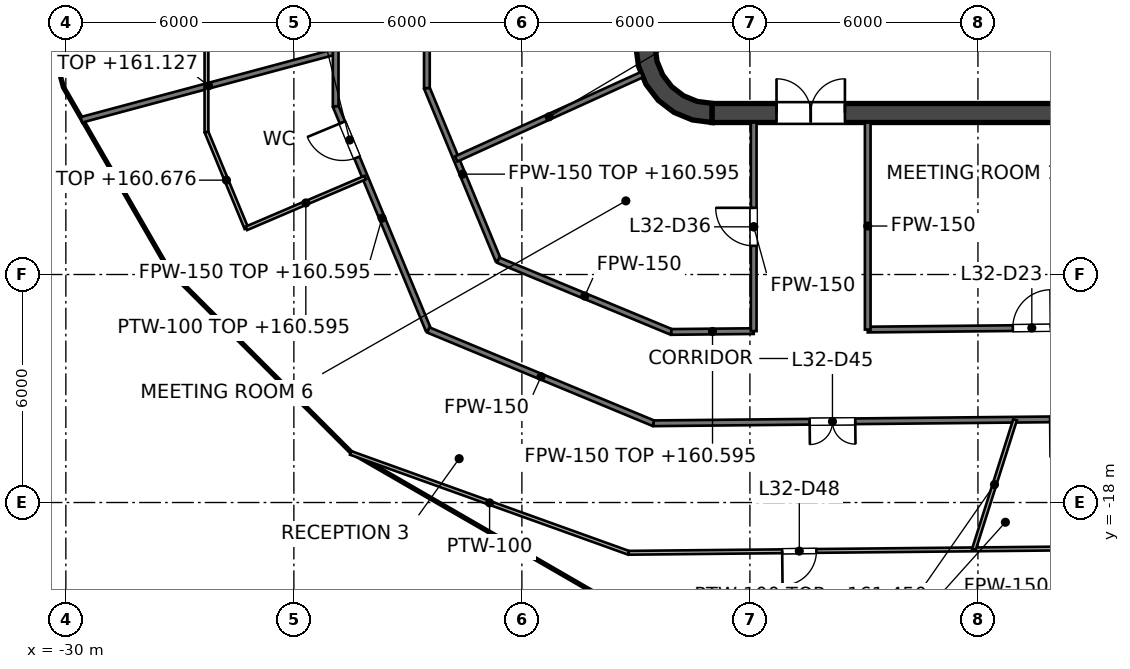
"""IFC4 building model, lengths in metres.
Left out: names, types, materials, properties, quantities, classifications, styles, units other than length and angle.
Written with IfcOpenShell. Run it as: python <this file> out.ifc"""

import sys

from ifc_helpers import new_model, si_unit, direction, frame, frame_2d, origin, place, context, subcontext, project, spatial, polyline, rectangle, outline, extrude, element, fill, save


model = new_model("IFC4")
c1 = context("Model", 3, precision=1e-05, world=origin(), true_north=direction((0.0, 1.0)))
c2 = subcontext(c1, "Body", "Model", "MODEL_VIEW")
j1 = project(units=[si_unit("LENGTHUNIT", "METRE"), si_unit("PLANEANGLEUNIT", "RADIAN")], contexts=[c1])
p1 = place(None, origin())
s1 = spatial("IfcSite", under=j1, at=p1, CompositionType="ELEMENT")
p2 = place(p1, origin())
s2 = spatial("IfcBuilding", under=s1, at=p2, CompositionType="ELEMENT")
p3 = place(p2, frame((0.0, 0.0, 157.6)))
s3 = spatial("IfcBuildingStorey", under=s2, at=p3, CompositionType="ELEMENT", Elevation=157.6)
p4 = place(p3, frame((-13.0, -7.75, 0.0), z_axis=(0.0, 0.0, 1.0), x_axis=(1.0, 0.0, 0.0)))
e1 = element("IfcWall", 1, at=p4, inside=s3, PredefinedType="SHEAR", context=c2, shape_type="SweptSolid", body=[
    extrude(rectangle(XDim=26.0, YDim=0.5, at=frame_2d((13.0, 0.0))), origin(), (0.0, 0.0, 1.0), 4.0),
])
p5 = place(p4, frame((1.7, 0.0, 0.0)))
e2 = element("IfcOpeningElement", 2, at=p5, cuts=e1, PredefinedType="OPENING", context=c2, shape_type="SweptSolid", body=[
    extrude(rectangle(XDim=1.8, YDim=2.1, at=frame_2d((0.9, 1.05))), frame((0.0, 0.25, 0.0), z_axis=(0.0, -1.0, 0.0), x_axis=(1.0, 0.0, 0.0)), (0.0, 0.0, 1.0), 0.5),
])
p6 = place(p4, frame((22.5, 0.0, 0.0)))
e3 = element("IfcOpeningElement", 3, at=p6, cuts=e1, PredefinedType="OPENING", context=c2, shape_type="SweptSolid", body=[
    extrude(rectangle(XDim=1.8, YDim=2.1, at=frame_2d((0.9, 1.05))), frame((0.0, 0.25, 0.0), z_axis=(0.0, -1.0, 0.0), x_axis=(1.0, 0.0, 0.0)), (0.0, 0.0, 1.0), 0.5),
])
p7 = place(p3, origin())
e4 = element("IfcWall", 4, at=p7, inside=s3, PredefinedType="SHEAR", context=c2, shape_type="SweptSolid", body=[
    extrude(outline(polyline([(-13.0, -8.0), (-13.0, -7.496), (-13.387, -7.445), (-13.748, -7.295), (-14.058, -7.058), (-14.295, -6.748), (-14.445, -6.387), (-14.496, -6.0), (-15.0, -6.0), (-14.932, -6.518), (-14.732, -7.0), (-14.414, -7.414), (-14.0, -7.732), (-13.518, -7.932), (-13.0, -8.0)])), origin(), (0.0, 0.0, 1.0), 4.0),
])
p8 = place(p3, frame((-9.0, -6.6, 0.0), z_axis=(0.0, 0.0, 1.0), x_axis=(0.0, 1.0, 0.0)))
e5 = element("IfcWall", 5, at=p8, inside=s3, PredefinedType="PARTITIONING", context=c2, shape_type="SweptSolid", body=[
    extrude(rectangle(XDim=2.5, YDim=0.25, at=frame_2d((1.25, 0.0))), origin(), (0.0, 0.0, 1.0), 3.85),
])
p9 = place(p8, frame((0.75, 0.0, 0.0)))
e6 = element("IfcOpeningElement", 6, at=p9, cuts=e5, PredefinedType="OPENING", context=c2, shape_type="SweptSolid", body=[
    extrude(rectangle(XDim=1.0, YDim=2.1, at=frame_2d((0.5, 1.05))), frame((0.0, 0.125, 0.0), z_axis=(0.0, -1.0, 0.0), x_axis=(1.0, 0.0, 0.0)), (0.0, 0.0, 1.0), 0.25),
])
p10 = place(p3, frame((-9.125, -7.05, 0.0), z_axis=(0.0, 0.0, 1.0), x_axis=(1.0, 0.0, 0.0)))
e7 = element("IfcWall", 7, at=p10, inside=s3, PredefinedType="SOLIDWALL", context=c2, shape_type="SweptSolid", body=[
    extrude(rectangle(XDim=18.25, YDim=0.9, at=frame_2d((9.125, 0.0))), origin(), (0.0, 0.0, 1.0), 3.85),
])
p11 = place(p3, frame((-11.8, -7.5, 0.0), z_axis=(0.0, 0.0, 1.0), x_axis=(0.0, 1.0, 0.0)))
e8 = element("IfcWall", 8, at=p11, inside=s3, PredefinedType="SOLIDWALL", context=c2, shape_type="SweptSolid", body=[
    extrude(rectangle(XDim=15.0, YDim=0.4, at=frame_2d((7.5, 0.0))), origin(), (0.0, 0.0, 1.0), 3.85),
])
p12 = place(p11, frame((11.3, 0.0, 0.0)))
e9 = element("IfcOpeningElement", 9, at=p12, cuts=e8, PredefinedType="OPENING", context=c2, shape_type="SweptSolid", body=[
    extrude(rectangle(XDim=1.1, YDim=2.1, at=frame_2d((0.55, 1.05))), frame((0.0, 0.2, 0.0), z_axis=(0.0, -1.0, 0.0), x_axis=(1.0, 0.0, 0.0)), (0.0, 0.0, 1.0), 0.4),
])
p13 = place(p11, frame((8.4, 0.0, 0.0)))
e10 = element("IfcOpeningElement", 10, at=p13, cuts=e8, PredefinedType="OPENING", context=c2, shape_type="SweptSolid", body=[
    extrude(rectangle(XDim=1.1, YDim=2.1, at=frame_2d((0.55, 1.05))), frame((0.0, 0.2, 0.0), z_axis=(0.0, -1.0, 0.0), x_axis=(1.0, 0.0, 0.0)), (0.0, 0.0, 1.0), 0.4),
])
p14 = place(p11, frame((5.5, 0.0, 0.0)))
e11 = element("IfcOpeningElement", 11, at=p14, cuts=e8, PredefinedType="OPENING", context=c2, shape_type="SweptSolid", body=[
    extrude(rectangle(XDim=1.1, YDim=2.1, at=frame_2d((0.55, 1.05))), frame((0.0, 0.2, 0.0), z_axis=(0.0, -1.0, 0.0), x_axis=(1.0, 0.0, 0.0)), (0.0, 0.0, 1.0), 0.4),
])
p15 = place(p11, frame((13.697, 0.0, 0.0)))
e12 = element("IfcOpeningElement", 12, at=p15, cuts=e8, PredefinedType="OPENING", context=c2, shape_type="SweptSolid", body=[
    extrude(rectangle(XDim=0.9, YDim=2.1, at=frame_2d((0.45, 1.05))), frame((0.0, 0.2, 0.0), z_axis=(0.0, -1.0, 0.0), x_axis=(1.0, 0.0, 0.0)), (0.0, 0.0, 1.0), 0.4),
])
p16 = place(p11, frame((0.403, 0.0, 0.0)))
e13 = element("IfcOpeningElement", 13, at=p16, cuts=e8, PredefinedType="OPENING", context=c2, shape_type="SweptSolid", body=[
    extrude(rectangle(XDim=0.9, YDim=2.1, at=frame_2d((0.45, 1.05))), frame((0.0, 0.2, 0.0), z_axis=(0.0, -1.0, 0.0), x_axis=(1.0, 0.0, 0.0)), (0.0, 0.0, 1.0), 0.4),
])
p17 = place(p3, frame((-22.9, -7.572, 0.0), z_axis=(0.0, 0.0, 1.0), x_axis=(0.382860357704, -0.923806227788, 0.0)))
e14 = element("IfcWall", 14, at=p17, inside=s3, PredefinedType="PARTITIONING", context=c2, shape_type="SweptSolid", body=[
    extrude(rectangle(XDim=6.374, YDim=0.15, at=frame_2d((3.187, 0.0))), origin(), (0.0, 0.0, 1.0), 2.995),
])
p18 = place(p17, frame((0.462, 0.0, 0.0)))
e15 = element("IfcOpeningElement", 15, at=p18, cuts=e14, PredefinedType="OPENING", context=c2, shape_type="SweptSolid", body=[
    extrude(rectangle(XDim=1.0, YDim=2.1, at=frame_2d((0.5, 1.05))), frame((0.0, 0.075, 0.0), z_axis=(0.0, -1.0, 0.0), x_axis=(1.0, 0.0, 0.0)), (0.0, 0.0, 1.0), 0.15),
])
p19 = place(p3, frame((-20.5, -7.095, 0.0), z_axis=(0.0, 0.0, 1.0), x_axis=(0.382878184095, -0.923798839653, 0.0)))
e16 = element("IfcWall", 16, at=p19, inside=s3, PredefinedType="PARTITIONING", context=c2, shape_type="SweptSolid", body=[
    extrude(rectangle(XDim=4.902, YDim=0.15, at=frame_2d((2.451, 0.0))), origin(), (0.0, 0.0, 1.0), 2.995),
])
p20 = place(p3, frame((-20.46, -13.46, 0.0), z_axis=(0.0, 0.0, 1.0), x_axis=(0.923801547606, -0.382871650349, 0.0)))
e17 = element("IfcWall", 17, at=p20, inside=s3, PredefinedType="PARTITIONING", context=c2, shape_type="SweptSolid", body=[
    extrude(rectangle(XDim=6.415, YDim=0.15, at=frame_2d((3.208, 0.0))), origin(), (0.0, 0.0, 1.0), 2.927),
])
p21 = place(p3, frame((-18.623, -11.623, 0.0), z_axis=(0.0, 0.0, 1.0), x_axis=(0.923791670587, -0.38289548098, 0.0)))
e18 = element("IfcWall", 18, at=p21, inside=s3, PredefinedType="PARTITIONING", context=c2, shape_type="SweptSolid", body=[
    extrude(rectangle(XDim=4.931, YDim=0.15, at=frame_2d((2.465, 0.0))), origin(), (0.0, 0.0, 1.0), 2.927),
])
p22 = place(p3, frame((-14.534, -15.915, 0.0), z_axis=(0.0, 0.0, 1.0), x_axis=(0.999950930262, 0.009906415532, 0.0)))
e19 = element("IfcWall", 19, at=p22, inside=s3, PredefinedType="PARTITIONING", context=c2, shape_type="SweptSolid", body=[
    extrude(rectangle(XDim=33.123, YDim=0.15, at=frame_2d((16.561, 0.0))), origin(), (0.0, 0.0, 1.0), 2.927),
])
p23 = place(p22, frame((4.106, 0.0, 0.0)))
e20 = element("IfcOpeningElement", 20, at=p23, cuts=e19, PredefinedType="OPENING", context=c2, shape_type="SweptSolid", body=[
    extrude(rectangle(XDim=1.2, YDim=2.1, at=frame_2d((0.6, 1.05))), frame((0.0, 0.075, 0.0), z_axis=(0.0, -1.0, 0.0), x_axis=(1.0, 0.0, 0.0)), (0.0, 0.0, 1.0), 0.15),
])
p24 = place(p22, frame((10.434, 0.0, 0.0)))
e21 = element("IfcOpeningElement", 21, at=p24, cuts=e19, PredefinedType="OPENING", context=c2, shape_type="SweptSolid", body=[
    extrude(rectangle(XDim=1.0, YDim=2.1, at=frame_2d((0.5, 1.05))), frame((0.0, 0.075, 0.0), z_axis=(0.0, -1.0, 0.0), x_axis=(1.0, 0.0, 0.0)), (0.0, 0.0, 1.0), 0.15),
])
p25 = place(p22, frame((12.942, 0.0, 0.0)))
e22 = element("IfcOpeningElement", 22, at=p25, cuts=e19, PredefinedType="OPENING", context=c2, shape_type="SweptSolid", body=[
    extrude(rectangle(XDim=1.0, YDim=2.1, at=frame_2d((0.5, 1.05))), frame((0.0, 0.075, 0.0), z_axis=(0.0, -1.0, 0.0), x_axis=(1.0, 0.0, 0.0)), (0.0, 0.0, 1.0), 0.15),
])
p26 = place(p22, frame((16.111, 0.0, 0.0)))
e23 = element("IfcOpeningElement", 23, at=p26, cuts=e19, PredefinedType="OPENING", context=c2, shape_type="SweptSolid", body=[
    extrude(rectangle(XDim=1.0, YDim=2.1, at=frame_2d((0.5, 1.05))), frame((0.0, 0.075, 0.0), z_axis=(0.0, -1.0, 0.0), x_axis=(1.0, 0.0, 0.0)), (0.0, 0.0, 1.0), 0.15),
])
p27 = place(p22, frame((24.318, 0.0, 0.0)))
e24 = element("IfcOpeningElement", 24, at=p27, cuts=e19, PredefinedType="OPENING", context=c2, shape_type="SweptSolid", body=[
    extrude(rectangle(XDim=1.0, YDim=2.1, at=frame_2d((0.5, 1.05))), frame((0.0, 0.075, 0.0), z_axis=(0.0, -1.0, 0.0), x_axis=(1.0, 0.0, 0.0)), (0.0, 0.0, 1.0), 0.15),
])
p28 = place(p3, frame((-14.068, -13.511, 0.0), z_axis=(0.0, 0.0, 1.0), x_axis=(0.999950911515, 0.009908307647, 0.0)))
e25 = element("IfcWall", 25, at=p28, inside=s3, PredefinedType="PARTITIONING", context=c2, shape_type="SweptSolid", body=[
    extrude(rectangle(XDim=2.168, YDim=0.15, at=frame_2d((1.084, 0.0))), origin(), (0.0, 0.0, 1.0), 2.995),
])
p29 = place(p3, frame((-8.9, -13.449, 0.0), z_axis=(0.0, 0.0, 1.0), x_axis=(0.999950834077, 0.009916119672, 0.0)))
e26 = element("IfcWall", 26, at=p29, inside=s3, PredefinedType="PARTITIONING", context=c2, shape_type="SweptSolid", body=[
    extrude(rectangle(XDim=17.801, YDim=0.15, at=frame_2d((8.9, 0.0))), origin(), (0.0, 0.0, 1.0), 2.927),
])
p30 = place(p29, frame((3.818, 0.0, 0.0)))
e27 = element("IfcOpeningElement", 27, at=p30, cuts=e26, PredefinedType="OPENING", context=c2, shape_type="SweptSolid", body=[
    extrude(rectangle(XDim=1.0, YDim=2.1, at=frame_2d((0.5, 1.05))), frame((0.0, 0.075, 0.0), z_axis=(0.0, -1.0, 0.0), x_axis=(1.0, 0.0, 0.0)), (0.0, 0.0, 1.0), 0.15),
])
p31 = place(p29, frame((8.391, 0.0, 0.0)))
e28 = element("IfcOpeningElement", 28, at=p31, cuts=e26, PredefinedType="OPENING", context=c2, shape_type="SweptSolid", body=[
    extrude(rectangle(XDim=1.0, YDim=2.1, at=frame_2d((0.5, 1.05))), frame((0.0, 0.075, 0.0), z_axis=(0.0, -1.0, 0.0), x_axis=(1.0, 0.0, 0.0)), (0.0, 0.0, 1.0), 0.15),
])
p32 = place(p29, frame((12.975, 0.0, 0.0)))
e29 = element("IfcOpeningElement", 29, at=p32, cuts=e26, PredefinedType="OPENING", context=c2, shape_type="SweptSolid", body=[
    extrude(rectangle(XDim=1.0, YDim=2.1, at=frame_2d((0.5, 1.05))), frame((0.0, 0.075, 0.0), z_axis=(0.0, -1.0, 0.0), x_axis=(1.0, 0.0, 0.0)), (0.0, 0.0, 1.0), 0.15),
])
p33 = place(p3, frame((-29.591, -7.929, 0.0), z_axis=(0.0, 0.0, 1.0), x_axis=(0.965923037728, 0.258829451931, 0.0)))
e30 = element("IfcWall", 30, at=p33, inside=s3, PredefinedType="PARTITIONING", context=c2, shape_type="SweptSolid", body=[
    extrude(rectangle(XDim=6.927, YDim=0.15, at=frame_2d((3.464, 0.0))), origin(), (0.0, 0.0, 1.0), 3.527),
])
p34 = place(p3, frame((-19.728, -8.958, 0.0), z_axis=(0.0, 0.0, 1.0), x_axis=(0.910629511797, 0.413223779863, 0.0)))
e31 = element("IfcWall", 31, at=p34, inside=s3, PredefinedType="PARTITIONING", context=c2, shape_type="SweptSolid", body=[
    extrude(rectangle(XDim=5.368, YDim=0.15, at=frame_2d((2.684, 0.0))), origin(), (0.0, 0.0, 1.0), 3.85),
])
p35 = place(p3, frame((-8.9, -13.449, 0.0), z_axis=(0.0, 0.0, 1.0), x_axis=(0.0, 1.0, 0.0)))
e32 = element("IfcWall", 32, at=p35, inside=s3, PredefinedType="PARTITIONING", context=c2, shape_type="SweptSolid", body=[
    extrude(rectangle(XDim=5.449, YDim=0.15, at=frame_2d((2.725, 0.0))), origin(), (0.0, 0.0, 1.0), 2.927),
])
p36 = place(p3, frame((-11.9, -13.49, 0.0), z_axis=(0.0, 0.0, 1.0), x_axis=(0.0, 1.0, 0.0)))
e33 = element("IfcWall", 33, at=p36, inside=s3, PredefinedType="PARTITIONING", context=c2, shape_type="SweptSolid", body=[
    extrude(rectangle(XDim=5.49, YDim=0.15, at=frame_2d((2.745, 0.0))), origin(), (0.0, 0.0, 1.0), 2.927),
])
p37 = place(p36, frame((2.245, 0.0, 0.0)))
e34 = element("IfcOpeningElement", 34, at=p37, cuts=e33, PredefinedType="OPENING", context=c2, shape_type="SweptSolid", body=[
    extrude(rectangle(XDim=1.0, YDim=2.1, at=frame_2d((0.5, 1.05))), frame((0.0, 0.075, 0.0), z_axis=(0.0, -1.0, 0.0), x_axis=(1.0, 0.0, 0.0)), (0.0, 0.0, 1.0), 0.15),
])
p38 = place(p3, frame((-20.5, -7.095, 0.0), z_axis=(0.0, 0.0, 1.0), x_axis=(0.0, 1.0, 0.0)))
e35 = element("IfcWall", 35, at=p38, inside=s3, PredefinedType="PARTITIONING", context=c2, shape_type="SweptSolid", body=[
    extrude(rectangle(XDim=14.569, YDim=0.15, at=frame_2d((7.285, 0.0))), origin(), (0.0, 0.0, 1.0), 2.927),
])
p39 = place(p38, frame((10.234, 0.0, 0.0)))
e36 = element("IfcOpeningElement", 36, at=p39, cuts=e35, PredefinedType="OPENING", context=c2, shape_type="SweptSolid", body=[
    extrude(rectangle(XDim=1.0, YDim=2.1, at=frame_2d((0.5, 1.05))), frame((0.0, 0.075, 0.0), z_axis=(0.0, -1.0, 0.0), x_axis=(1.0, 0.0, 0.0)), (0.0, 0.0, 1.0), 0.15),
])
p40 = place(p38, frame((3.0, 0.0, 0.0)))
e37 = element("IfcOpeningElement", 37, at=p40, cuts=e35, PredefinedType="OPENING", context=c2, shape_type="SweptSolid", body=[
    extrude(rectangle(XDim=1.0, YDim=2.1, at=frame_2d((0.5, 1.05))), frame((0.0, 0.075, 0.0), z_axis=(0.0, -1.0, 0.0), x_axis=(1.0, 0.0, 0.0)), (0.0, 0.0, 1.0), 0.15),
])
p41 = place(p3, frame((-22.9, -7.572, 0.0), z_axis=(0.0, 0.0, 1.0), x_axis=(0.0, 1.0, 0.0)))
e38 = element("IfcWall", 38, at=p41, inside=s3, PredefinedType="PARTITIONING", context=c2, shape_type="SweptSolid", body=[
    extrude(rectangle(XDim=15.689, YDim=0.15, at=frame_2d((7.844, 0.0))), origin(), (0.0, 0.0, 1.0), 2.927),
])
p42 = place(p41, frame((8.062, 0.0, 0.0)))
e39 = element("IfcOpeningElement", 39, at=p42, cuts=e38, PredefinedType="OPENING", context=c2, shape_type="SweptSolid", body=[
    extrude(rectangle(XDim=1.0, YDim=2.1, at=frame_2d((0.5, 1.05))), frame((0.0, 0.075, 0.0), z_axis=(0.0, -1.0, 0.0), x_axis=(1.0, 0.0, 0.0)), (0.0, 0.0, 1.0), 0.15),
])
p43 = place(p3, frame((-26.3, -8.249, 0.0), z_axis=(0.0, 0.0, 1.0), x_axis=(0.382878044957, -0.92379889732, 0.0)))
e40 = element("IfcWall", 40, at=p43, inside=s3, PredefinedType="PARTITIONING", context=c2, shape_type="SweptSolid", body=[
    extrude(rectangle(XDim=2.745, YDim=0.1, at=frame_2d((1.373, 0.0))), origin(), (0.0, 0.0, 1.0), 3.076),
])
p44 = place(p3, frame((-22.506, -16.695, 0.0), z_axis=(0.0, 0.0, 1.0), x_axis=(0.941067528236, -0.338218727009, 0.0)))
e41 = element("IfcWall", 41, at=p44, inside=s3, PredefinedType="PARTITIONING", context=c2, shape_type="SweptSolid", body=[
    extrude(rectangle(XDim=7.77, YDim=0.1, at=frame_2d((3.885, 0.0))), origin(), (0.0, 0.0, 1.0), 2.927),
])
p45 = place(p3, frame((-15.194, -19.323, 0.0), z_axis=(0.0, 0.0, 1.0), x_axis=(0.999950976029, 0.009901794681, 0.0)))
e42 = element("IfcWall", 42, at=p45, inside=s3, PredefinedType="PARTITIONING", context=c2, shape_type="SweptSolid", body=[
    extrude(rectangle(XDim=33.73, YDim=0.1, at=frame_2d((16.865, 0.0))), origin(), (0.0, 0.0, 1.0), 2.927),
])
p46 = place(p45, frame((4.043, 0.0, 0.0)))
e43 = element("IfcOpeningElement", 43, at=p46, cuts=e42, PredefinedType="OPENING", context=c2, shape_type="SweptSolid", body=[
    extrude(rectangle(XDim=0.9, YDim=2.1, at=frame_2d((0.45, 1.05))), frame((0.0, 0.05, 0.0), z_axis=(0.0, -1.0, 0.0), x_axis=(1.0, 0.0, 0.0)), (0.0, 0.0, 1.0), 0.1),
])
p47 = place(p45, frame((26.398, 0.0, 0.0)))
e44 = element("IfcOpeningElement", 44, at=p47, cuts=e42, PredefinedType="OPENING", context=c2, shape_type="SweptSolid", body=[
    extrude(rectangle(XDim=0.9, YDim=2.1, at=frame_2d((0.45, 1.05))), frame((0.0, 0.05, 0.0), z_axis=(0.0, -1.0, 0.0), x_axis=(1.0, 0.0, 0.0)), (0.0, 0.0, 1.0), 0.1),
])
p48 = place(p3, frame((-25.249, -10.785, 0.0), z_axis=(0.0, 0.0, 1.0), x_axis=(0.919590085221, 0.392879211925, 0.0)))
e45 = element("IfcWall", 45, at=p48, inside=s3, PredefinedType="PARTITIONING", context=c2, shape_type="SweptSolid", body=[
    extrude(rectangle(XDim=3.4, YDim=0.1, at=frame_2d((1.7, 0.0))), origin(), (0.0, 0.0, 1.0), 2.995),
])
p49 = place(p3, frame((-6.106, -19.233, 0.0), z_axis=(0.0, 0.0, 1.0), x_axis=(0.302626350856, 0.95310927588, 0.0)))
e46 = element("IfcWall", 46, at=p49, inside=s3, PredefinedType="PARTITIONING", context=c2, shape_type="SweptSolid", body=[
    extrude(rectangle(XDim=3.579, YDim=0.1, at=frame_2d((1.789, 0.0))), origin(), (0.0, 0.0, 1.0), 3.85),
])
p50 = place(p3, frame((-26.3, -8.249, 0.0), z_axis=(0.0, 0.0, 1.0), x_axis=(0.0, 1.0, 0.0)))
e47 = element("IfcWall", 47, at=p50, inside=s3, PredefinedType="PARTITIONING", context=c2, shape_type="SweptSolid", body=[
    extrude(rectangle(XDim=17.277, YDim=0.1, at=frame_2d((8.639, 0.0))), origin(), (0.0, 0.0, 1.0), 2.927),
])
p51 = place(p50, frame((8.739, 0.0, 0.0)))
e48 = element("IfcOpeningElement", 48, at=p51, cuts=e47, PredefinedType="OPENING", context=c2, shape_type="SweptSolid", body=[
    extrude(rectangle(XDim=0.9, YDim=2.1, at=frame_2d((0.45, 1.05))), frame((0.0, 0.05, 0.0), z_axis=(0.0, -1.0, 0.0), x_axis=(1.0, 0.0, 0.0)), (0.0, 0.0, 1.0), 0.1),
])
p52 = place(p16, origin())
e49 = element("IfcDoor", 49, at=p52, inside=s3, OperationType="SINGLE_SWING_LEFT", PredefinedType="DOOR", context=c2, shape_type="SweptSolid", body=[
    extrude(rectangle(XDim=0.9, YDim=2.1, at=frame_2d((0.45, 1.05))), frame((0.0, 0.025, 0.0), z_axis=(0.0, -1.0, 0.0), x_axis=(1.0, 0.0, 0.0)), (0.0, 0.0, 1.0), 0.05),
])
fill(e13, e49)
p53 = place(p5, origin())
e50 = element("IfcDoor", 50, at=p53, inside=s3, OperationType="DOUBLE_DOOR_SINGLE_SWING", PredefinedType="DOOR", context=c2, shape_type="SweptSolid", body=[
    extrude(rectangle(XDim=1.8, YDim=2.1, at=frame_2d((0.9, 1.05))), frame((0.0, 0.025, 0.0), z_axis=(0.0, -1.0, 0.0), x_axis=(1.0, 0.0, 0.0)), (0.0, 0.0, 1.0), 0.05),
])
fill(e2, e50)
p54 = place(p30, origin())
e51 = element("IfcDoor", 51, at=p54, inside=s3, OperationType="SINGLE_SWING_RIGHT", PredefinedType="DOOR", context=c2, shape_type="SweptSolid", body=[
    extrude(rectangle(XDim=1.0, YDim=2.1, at=frame_2d((0.5, 1.05))), frame((0.0, 0.025, 0.0), z_axis=(0.0, -1.0, 0.0), x_axis=(1.0, 0.0, 0.0)), (0.0, 0.0, 1.0), 0.05),
])
fill(e27, e51)
p55 = place(p37, origin())
e52 = element("IfcDoor", 52, at=p55, inside=s3, OperationType="SINGLE_SWING_RIGHT", PredefinedType="DOOR", context=c2, shape_type="SweptSolid", body=[
    extrude(rectangle(XDim=1.0, YDim=2.1, at=frame_2d((0.5, 1.05))), frame((0.0, 0.025, 0.0), z_axis=(0.0, -1.0, 0.0), x_axis=(1.0, 0.0, 0.0)), (0.0, 0.0, 1.0), 0.05),
])
fill(e34, e52)
p56 = place(p18, origin())
e53 = element("IfcDoor", 53, at=p56, inside=s3, OperationType="SINGLE_SWING_LEFT", PredefinedType="DOOR", context=c2, shape_type="SweptSolid", body=[
    extrude(rectangle(XDim=1.0, YDim=2.1, at=frame_2d((0.5, 1.05))), frame((0.0, 0.025, 0.0), z_axis=(0.0, -1.0, 0.0), x_axis=(1.0, 0.0, 0.0)), (0.0, 0.0, 1.0), 0.05),
])
fill(e15, e53)
p57 = place(p23, origin())
e54 = element("IfcDoor", 54, at=p57, inside=s3, OperationType="DOUBLE_DOOR_SINGLE_SWING", PredefinedType="DOOR", context=c2, shape_type="SweptSolid", body=[
    extrude(rectangle(XDim=1.2, YDim=2.1, at=frame_2d((0.6, 1.05))), frame((0.0, 0.025, 0.0), z_axis=(0.0, -1.0, 0.0), x_axis=(1.0, 0.0, 0.0)), (0.0, 0.0, 1.0), 0.05),
])
fill(e20, e54)
p58 = place(p24, origin())
e55 = element("IfcDoor", 55, at=p58, inside=s3, OperationType="SINGLE_SWING_LEFT", PredefinedType="DOOR", context=c2, shape_type="SweptSolid", body=[
    extrude(rectangle(XDim=1.0, YDim=2.1, at=frame_2d((0.5, 1.05))), frame((0.0, 0.025, 0.0), z_axis=(0.0, -1.0, 0.0), x_axis=(1.0, 0.0, 0.0)), (0.0, 0.0, 1.0), 0.05),
])
fill(e21, e55)
p59 = place(p46, origin())
e56 = element("IfcDoor", 56, at=p59, inside=s3, OperationType="SINGLE_SWING_LEFT", PredefinedType="DOOR", context=c2, shape_type="SweptSolid", body=[
    extrude(rectangle(XDim=0.9, YDim=2.1, at=frame_2d((0.45, 1.05))), frame((0.0, 0.025, 0.0), z_axis=(0.0, -1.0, 0.0), x_axis=(1.0, 0.0, 0.0)), (0.0, 0.0, 1.0), 0.05),
])
fill(e43, e56)
save(model, sys.argv[1])
